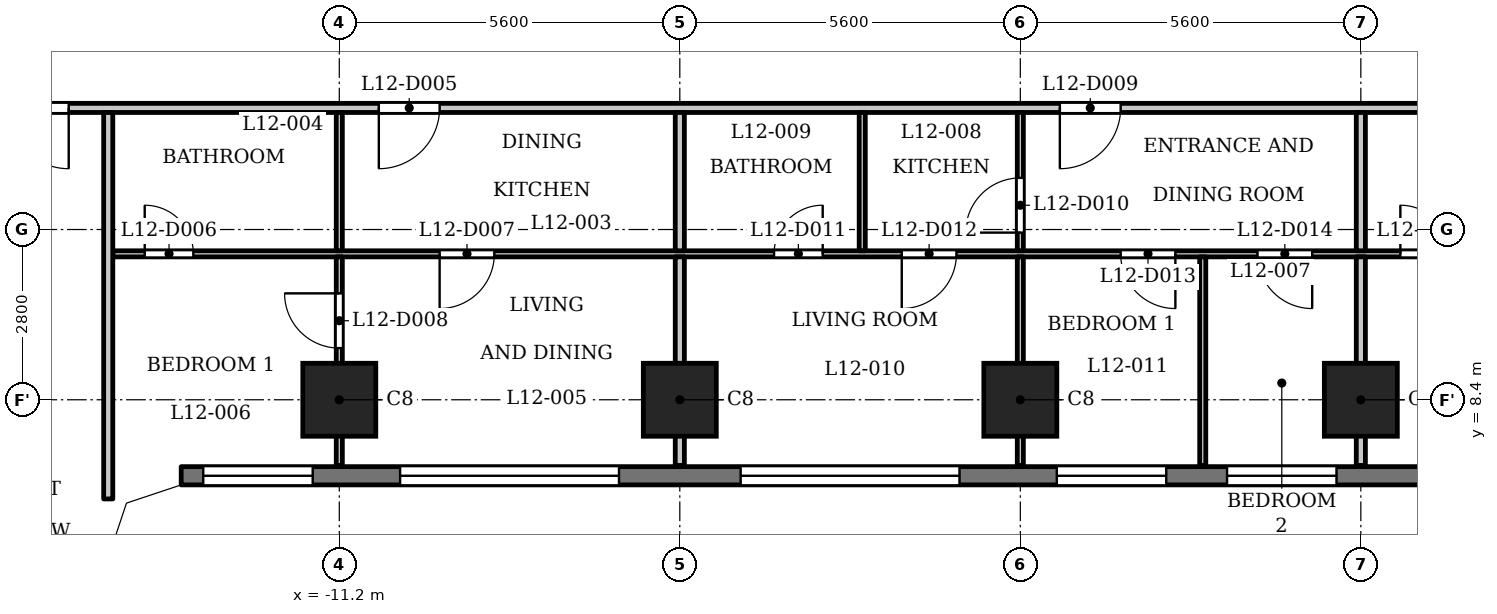
"""IFC4 building model, lengths in metres.
Left out: names, types, materials, properties, quantities, classifications, styles, units other than length and angle.
Written with IfcOpenShell. Run it as: python <this file> out.ifc"""

import sys

from ifc_helpers import new_model, si_unit, direction, frame, frame_2d, origin, origin_2d, place, context, subcontext, project, spatial, polyline, rectangle, outline, extrude, element, fill, save


model = new_model("IFC4")
c1 = context("Model", 3, precision=1e-05, world=origin(), true_north=direction((0.0, 1.0)))
c2 = subcontext(c1, "Body", "Model", "MODEL_VIEW")
j1 = project(units=[si_unit("LENGTHUNIT", "METRE"), si_unit("PLANEANGLEUNIT", "RADIAN")], contexts=[c1])
p1 = place(None, origin())
s1 = spatial("IfcSite", under=j1, at=p1, CompositionType="ELEMENT")
p2 = place(p1, origin())
s2 = spatial("IfcBuilding", under=s1, at=p2, CompositionType="ELEMENT")
p3 = place(p2, frame((0.0, 0.0, 51.5)))
s3 = spatial("IfcBuildingStorey", under=s2, at=p3, CompositionType="ELEMENT", Elevation=51.5)
for number, where, z_axis, x_axis in (
    (1, (-11.2, 8.4, 0.0), (0.0, 0.0, 1.0), (1.0, 0.0, 0.0)),
    (2, (-5.6, 8.4, 0.0), (0.0, 0.0, 1.0), (1.0, 0.0, 0.0)),
    (3, (0.0, 8.4, 0.0), (0.0, 0.0, 1.0), (1.0, 0.0, 0.0)),
    (4, (5.6, 8.4, 0.0), (0.0, 0.0, 1.0), (1.0, 0.0, 0.0)),
):
    element("IfcColumn", number, at=place(p3, frame(where, z_axis=z_axis, x_axis=x_axis)), inside=s3, PredefinedType="COLUMN", context=c2, shape_type="SweptSolid", body=[
        extrude(rectangle(XDim=1.2, YDim=1.2, at=origin_2d()), origin(), (0.0, 0.0, 1.0), 3.5),
    ])
p4 = place(p3, frame((-13.8, 7.15, 0.0), z_axis=(0.0, 0.0, 1.0), x_axis=(1.0, 0.0, 0.0)))
e5 = element("IfcWall", 5, at=p4, inside=s3, PredefinedType="SOLIDWALL", context=c2, shape_type="SweptSolid", body=[
    extrude(rectangle(XDim=27.6, YDim=0.3, at=frame_2d((13.8, 0.0))), origin(), (0.0, 0.0, 1.0), 3.2),
])
p5 = place(p4, frame((0.363, 0.0, 0.9)))
e6 = element("IfcOpeningElement", 6, at=p5, cuts=e5, PredefinedType="OPENING", context=c2, shape_type="SweptSolid", body=[
    extrude(rectangle(XDim=1.8, YDim=1.25, at=frame_2d((0.9, 0.625))), frame((0.0, 0.16, 0.0), z_axis=(0.0, -1.0, 0.0), x_axis=(1.0, 0.0, 0.0)), (0.0, 0.0, 1.0), 0.32),
])
p6 = place(p4, frame((3.6, 0.0, 1.2)))
e7 = element("IfcOpeningElement", 7, at=p6, cuts=e5, PredefinedType="OPENING", context=c2, shape_type="SweptSolid", body=[
    extrude(rectangle(XDim=3.6, YDim=0.95, at=frame_2d((1.8, 0.475))), frame((0.0, 0.16, 0.0), z_axis=(0.0, -1.0, 0.0), x_axis=(1.0, 0.0, 0.0)), (0.0, 0.0, 1.0), 0.32),
])
p7 = place(p4, frame((9.2, 0.0, 1.2)))
e8 = element("IfcOpeningElement", 8, at=p7, cuts=e5, PredefinedType="OPENING", context=c2, shape_type="SweptSolid", body=[
    extrude(rectangle(XDim=3.6, YDim=0.95, at=frame_2d((1.8, 0.475))), frame((0.0, 0.16, 0.0), z_axis=(0.0, -1.0, 0.0), x_axis=(1.0, 0.0, 0.0)), (0.0, 0.0, 1.0), 0.32),
])
p8 = place(p4, frame((14.4, 0.0, 0.9)))
e9 = element("IfcOpeningElement", 9, at=p8, cuts=e5, PredefinedType="OPENING", context=c2, shape_type="SweptSolid", body=[
    extrude(rectangle(XDim=1.8, YDim=1.25, at=frame_2d((0.9, 0.625))), frame((0.0, 0.16, 0.0), z_axis=(0.0, -1.0, 0.0), x_axis=(1.0, 0.0, 0.0)), (0.0, 0.0, 1.0), 0.32),
])
p9 = place(p4, frame((17.2, 0.0, 0.9)))
e10 = element("IfcOpeningElement", 10, at=p9, cuts=e5, PredefinedType="OPENING", context=c2, shape_type="SweptSolid", body=[
    extrude(rectangle(XDim=1.8, YDim=1.25, at=frame_2d((0.9, 0.625))), frame((0.0, 0.16, 0.0), z_axis=(0.0, -1.0, 0.0), x_axis=(1.0, 0.0, 0.0)), (0.0, 0.0, 1.0), 0.32),
])
p10 = place(p4, frame((20.4, 0.0, 1.2)))
e11 = element("IfcOpeningElement", 11, at=p10, cuts=e5, PredefinedType="OPENING", context=c2, shape_type="SweptSolid", body=[
    extrude(rectangle(XDim=3.6, YDim=0.95, at=frame_2d((1.8, 0.475))), frame((0.0, 0.16, 0.0), z_axis=(0.0, -1.0, 0.0), x_axis=(1.0, 0.0, 0.0)), (0.0, 0.0, 1.0), 0.32),
])
p11 = place(p4, frame((25.438, 0.0, 0.9)))
e12 = element("IfcOpeningElement", 12, at=p11, cuts=e5, PredefinedType="OPENING", context=c2, shape_type="SweptSolid", body=[
    extrude(rectangle(XDim=1.8, YDim=1.25, at=frame_2d((0.9, 0.625))), frame((0.0, 0.16, 0.0), z_axis=(0.0, -1.0, 0.0), x_axis=(1.0, 0.0, 0.0)), (0.0, 0.0, 1.0), 0.32),
])
p12 = place(p3, frame((-14.925, 10.8, 0.0), z_axis=(0.0, 0.0, 1.0), x_axis=(1.0, 0.0, 0.0)))
e13 = element("IfcWall", 13, at=p12, inside=s3, PredefinedType="PARTITIONING", context=c2, shape_type="SweptSolid", body=[
    extrude(rectangle(XDim=29.85, YDim=0.1, at=frame_2d((14.925, 0.0))), origin(), (0.0, 0.0, 1.0), 3.2),
])
p13 = place(p12, frame((0.525, 0.0, 0.0)))
e14 = element("IfcOpeningElement", 14, at=p13, cuts=e13, PredefinedType="OPENING", context=c2, shape_type="SweptSolid", body=[
    extrude(rectangle(XDim=0.8, YDim=2.1, at=frame_2d((0.4, 1.05))), frame((0.0, 0.06, 0.0), z_axis=(0.0, -1.0, 0.0), x_axis=(1.0, 0.0, 0.0)), (0.0, 0.0, 1.0), 0.12),
])
p14 = place(p12, frame((5.375, 0.0, 0.0)))
e15 = element("IfcOpeningElement", 15, at=p14, cuts=e13, PredefinedType="OPENING", context=c2, shape_type="SweptSolid", body=[
    extrude(rectangle(XDim=0.9, YDim=2.1, at=frame_2d((0.45, 1.05))), frame((0.0, 0.06, 0.0), z_axis=(0.0, -1.0, 0.0), x_axis=(1.0, 0.0, 0.0)), (0.0, 0.0, 1.0), 0.12),
])
p15 = place(p12, frame((10.875, 0.0, 0.0)))
e16 = element("IfcOpeningElement", 16, at=p15, cuts=e13, PredefinedType="OPENING", context=c2, shape_type="SweptSolid", body=[
    extrude(rectangle(XDim=0.8, YDim=2.1, at=frame_2d((0.4, 1.05))), frame((0.0, 0.06, 0.0), z_axis=(0.0, -1.0, 0.0), x_axis=(1.0, 0.0, 0.0)), (0.0, 0.0, 1.0), 0.12),
])
p16 = place(p12, frame((12.975, 0.0, 0.0)))
e17 = element("IfcOpeningElement", 17, at=p16, cuts=e13, PredefinedType="OPENING", context=c2, shape_type="SweptSolid", body=[
    extrude(rectangle(XDim=0.9, YDim=2.1, at=frame_2d((0.45, 1.05))), frame((0.0, 0.06, 0.0), z_axis=(0.0, -1.0, 0.0), x_axis=(1.0, 0.0, 0.0)), (0.0, 0.0, 1.0), 0.12),
])
p17 = place(p12, frame((16.575, 0.0, 0.0)))
e18 = element("IfcOpeningElement", 18, at=p17, cuts=e13, PredefinedType="OPENING", context=c2, shape_type="SweptSolid", body=[
    extrude(rectangle(XDim=0.9, YDim=2.1, at=frame_2d((0.45, 1.05))), frame((0.0, 0.06, 0.0), z_axis=(0.0, -1.0, 0.0), x_axis=(1.0, 0.0, 0.0)), (0.0, 0.0, 1.0), 0.12),
])
p18 = place(p12, frame((18.825, 0.0, 0.0)))
e19 = element("IfcOpeningElement", 19, at=p18, cuts=e13, PredefinedType="OPENING", context=c2, shape_type="SweptSolid", body=[
    extrude(rectangle(XDim=0.9, YDim=2.1, at=frame_2d((0.45, 1.05))), frame((0.0, 0.06, 0.0), z_axis=(0.0, -1.0, 0.0), x_axis=(1.0, 0.0, 0.0)), (0.0, 0.0, 1.0), 0.12),
])
p19 = place(p12, frame((21.175, 0.0, 0.0)))
e20 = element("IfcOpeningElement", 20, at=p19, cuts=e13, PredefinedType="OPENING", context=c2, shape_type="SweptSolid", body=[
    extrude(rectangle(XDim=0.8, YDim=2.1, at=frame_2d((0.4, 1.05))), frame((0.0, 0.06, 0.0), z_axis=(0.0, -1.0, 0.0), x_axis=(1.0, 0.0, 0.0)), (0.0, 0.0, 1.0), 0.12),
])
p20 = place(p12, frame((27.775, 0.0, 0.0)))
e21 = element("IfcOpeningElement", 21, at=p20, cuts=e13, PredefinedType="OPENING", context=c2, shape_type="SweptSolid", body=[
    extrude(rectangle(XDim=0.9, YDim=2.1, at=frame_2d((0.45, 1.05))), frame((0.0, 0.06, 0.0), z_axis=(0.0, -1.0, 0.0), x_axis=(1.0, 0.0, 0.0)), (0.0, 0.0, 1.0), 0.12),
])
p21 = place(p3, frame((-17.4, 13.2, 0.0), z_axis=(0.0, 0.0, 1.0), x_axis=(1.0, 0.0, 0.0)))
e22 = element("IfcWall", 22, at=p21, inside=s3, PredefinedType="PARTITIONING", context=c2, shape_type="SweptSolid", body=[
    extrude(rectangle(XDim=34.8, YDim=0.15, at=frame_2d((17.4, 0.0))), origin(), (0.0, 0.0, 1.0), 3.2),
])
p22 = place(p21, frame((0.75, 0.0, 0.0)))
e23 = element("IfcOpeningElement", 23, at=p22, cuts=e22, PredefinedType="OPENING", context=c2, shape_type="SweptSolid", body=[
    extrude(rectangle(XDim=1.0, YDim=2.1, at=frame_2d((0.5, 1.05))), frame((0.0, 0.085, 0.0), z_axis=(0.0, -1.0, 0.0), x_axis=(1.0, 0.0, 0.0)), (0.0, 0.0, 1.0), 0.17),
])
p23 = place(p21, frame((33.15, 0.0, 0.0)))
e24 = element("IfcOpeningElement", 24, at=p23, cuts=e22, PredefinedType="OPENING", context=c2, shape_type="SweptSolid", body=[
    extrude(rectangle(XDim=1.0, YDim=2.1, at=frame_2d((0.5, 1.05))), frame((0.0, 0.085, 0.0), z_axis=(0.0, -1.0, 0.0), x_axis=(1.0, 0.0, 0.0)), (0.0, 0.0, 1.0), 0.17),
])
p24 = place(p21, frame((6.85, 0.0, 0.0)))
e25 = element("IfcOpeningElement", 25, at=p24, cuts=e22, PredefinedType="OPENING", context=c2, shape_type="SweptSolid", body=[
    extrude(rectangle(XDim=1.0, YDim=2.1, at=frame_2d((0.5, 1.05))), frame((0.0, 0.085, 0.0), z_axis=(0.0, -1.0, 0.0), x_axis=(1.0, 0.0, 0.0)), (0.0, 0.0, 1.0), 0.17),
])
p25 = place(p21, frame((18.05, 0.0, 0.0)))
e26 = element("IfcOpeningElement", 26, at=p25, cuts=e22, PredefinedType="OPENING", context=c2, shape_type="SweptSolid", body=[
    extrude(rectangle(XDim=1.0, YDim=2.1, at=frame_2d((0.5, 1.05))), frame((0.0, 0.085, 0.0), z_axis=(0.0, -1.0, 0.0), x_axis=(1.0, 0.0, 0.0)), (0.0, 0.0, 1.0), 0.17),
])
p26 = place(p21, frame((29.25, 0.0, 0.0)))
e27 = element("IfcOpeningElement", 27, at=p26, cuts=e22, PredefinedType="OPENING", context=c2, shape_type="SweptSolid", body=[
    extrude(rectangle(XDim=1.0, YDim=2.1, at=frame_2d((0.5, 1.05))), frame((0.0, 0.085, 0.0), z_axis=(0.0, -1.0, 0.0), x_axis=(1.0, 0.0, 0.0)), (0.0, 0.0, 1.0), 0.17),
])
p27 = place(p3, frame((-15.0, 6.769, 0.0), z_axis=(0.0, 0.0, 1.0), x_axis=(0.0, 1.0, 0.0)))
e28 = element("IfcWall", 28, at=p27, inside=s3, PredefinedType="PARTITIONING", context=c2, shape_type="SweptSolid", body=[
    extrude(rectangle(XDim=6.356, YDim=0.15, at=frame_2d((3.178, 0.0))), origin(), (0.0, 0.0, 1.0), 3.2),
])
p28 = place(p3, frame((-11.2, 7.32, 0.0), z_axis=(0.0, 0.0, 1.0), x_axis=(0.0, 1.0, 0.0)))
e29 = element("IfcWall", 29, at=p28, inside=s3, PredefinedType="PARTITIONING", context=c2, shape_type="SweptSolid", body=[
    extrude(rectangle(XDim=3.43, YDim=0.1, at=frame_2d((1.715, 0.0))), origin(), (0.0, 0.0, 1.0), 3.2),
])
p29 = place(p28, frame((1.93, 0.0, 0.0)))
e30 = element("IfcOpeningElement", 30, at=p29, cuts=e29, PredefinedType="OPENING", context=c2, shape_type="SweptSolid", body=[
    extrude(rectangle(XDim=0.9, YDim=2.1, at=frame_2d((0.45, 1.05))), frame((0.0, 0.06, 0.0), z_axis=(0.0, -1.0, 0.0), x_axis=(1.0, 0.0, 0.0)), (0.0, 0.0, 1.0), 0.12),
])
p30 = place(p3, frame((-11.2, 10.85, 0.0), z_axis=(0.0, 0.0, 1.0), x_axis=(0.0, 1.0, 0.0)))
e31 = element("IfcWall", 31, at=p30, inside=s3, PredefinedType="PARTITIONING", context=c2, shape_type="SweptSolid", body=[
    extrude(rectangle(XDim=2.275, YDim=0.1, at=frame_2d((1.137, 0.0))), origin(), (0.0, 0.0, 1.0), 3.2),
])
p31 = place(p3, frame((-5.6, 7.32, 0.0), z_axis=(0.0, 0.0, 1.0), x_axis=(0.0, 1.0, 0.0)))
e32 = element("IfcWall", 32, at=p31, inside=s3, PredefinedType="PARTITIONING", context=c2, shape_type="SweptSolid", body=[
    extrude(rectangle(XDim=3.43, YDim=0.15, at=frame_2d((1.715, 0.0))), origin(), (0.0, 0.0, 1.0), 3.2),
])
p32 = place(p3, frame((-5.6, 10.85, 0.0), z_axis=(0.0, 0.0, 1.0), x_axis=(0.0, 1.0, 0.0)))
e33 = element("IfcWall", 33, at=p32, inside=s3, PredefinedType="PARTITIONING", context=c2, shape_type="SweptSolid", body=[
    extrude(rectangle(XDim=2.275, YDim=0.15, at=frame_2d((1.137, 0.0))), origin(), (0.0, 0.0, 1.0), 3.2),
])
p33 = place(p3, frame((-2.6, 10.85, 0.0), z_axis=(0.0, 0.0, 1.0), x_axis=(0.0, 1.0, 0.0)))
e34 = element("IfcWall", 34, at=p33, inside=s3, PredefinedType="PARTITIONING", context=c2, shape_type="SweptSolid", body=[
    extrude(rectangle(XDim=2.275, YDim=0.1, at=frame_2d((1.137, 0.0))), origin(), (0.0, 0.0, 1.0), 3.2),
])
p34 = place(p3, frame((0.0, 7.32, 0.0), z_axis=(0.0, 0.0, 1.0), x_axis=(0.0, 1.0, 0.0)))
e35 = element("IfcWall", 35, at=p34, inside=s3, PredefinedType="PARTITIONING", context=c2, shape_type="SweptSolid", body=[
    extrude(rectangle(XDim=3.43, YDim=0.1, at=frame_2d((1.715, 0.0))), origin(), (0.0, 0.0, 1.0), 3.2),
])
p35 = place(p3, frame((0.0, 10.85, 0.0), z_axis=(0.0, 0.0, 1.0), x_axis=(0.0, 1.0, 0.0)))
e36 = element("IfcWall", 36, at=p35, inside=s3, PredefinedType="PARTITIONING", context=c2, shape_type="SweptSolid", body=[
    extrude(rectangle(XDim=2.275, YDim=0.1, at=frame_2d((1.137, 0.0))), origin(), (0.0, 0.0, 1.0), 3.2),
])
p36 = place(p35, frame((0.299, 0.0, 0.0)))
e37 = element("IfcOpeningElement", 37, at=p36, cuts=e36, PredefinedType="OPENING", context=c2, shape_type="SweptSolid", body=[
    extrude(rectangle(XDim=0.9, YDim=2.1, at=frame_2d((0.45, 1.05))), frame((0.0, 0.06, 0.0), z_axis=(0.0, -1.0, 0.0), x_axis=(1.0, 0.0, 0.0)), (0.0, 0.0, 1.0), 0.12),
])
p37 = place(p3, frame((3.0, 7.32, 0.0), z_axis=(0.0, 0.0, 1.0), x_axis=(0.0, 1.0, 0.0)))
e38 = element("IfcWall", 38, at=p37, inside=s3, PredefinedType="PARTITIONING", context=c2, shape_type="SweptSolid", body=[
    extrude(rectangle(XDim=3.43, YDim=0.1, at=frame_2d((1.715, 0.0))), origin(), (0.0, 0.0, 1.0), 3.2),
])
p38 = place(p3, frame((5.6, 7.32, 0.0), z_axis=(0.0, 0.0, 1.0), x_axis=(0.0, 1.0, 0.0)))
e39 = element("IfcWall", 39, at=p38, inside=s3, PredefinedType="PARTITIONING", context=c2, shape_type="SweptSolid", body=[
    extrude(rectangle(XDim=3.43, YDim=0.15, at=frame_2d((1.715, 0.0))), origin(), (0.0, 0.0, 1.0), 3.2),
])
p39 = place(p3, frame((5.6, 10.85, 0.0), z_axis=(0.0, 0.0, 1.0), x_axis=(0.0, 1.0, 0.0)))
e40 = element("IfcWall", 40, at=p39, inside=s3, PredefinedType="PARTITIONING", context=c2, shape_type="SweptSolid", body=[
    extrude(rectangle(XDim=2.275, YDim=0.15, at=frame_2d((1.137, 0.0))), origin(), (0.0, 0.0, 1.0), 3.2),
])
p40 = place(p3, origin())
e41 = element("IfcWall", 41, at=p40, inside=s3, PredefinedType="SOLIDWALL", context=c2, shape_type="SweptSolid", body=[
    extrude(outline(polyline([(-13.849, 7.3), (-14.937, 6.937), (-15.3, 5.849), (-15.3, 5.8), (-15.0, 5.8), (-14.7, 6.7), (-13.8, 7.0), (-13.8, 7.3), (-13.849, 7.3)])), origin(), (0.0, 0.0, 1.0), 3.2),
])
p41 = place(p22, origin())
e42 = element("IfcDoor", 42, at=p41, inside=s3, OperationType="SINGLE_SWING_RIGHT", PredefinedType="DOOR", context=c2, shape_type="SweptSolid", body=[
    extrude(rectangle(XDim=1.0, YDim=2.1, at=frame_2d((0.5, 1.05))), frame((0.0, 0.025, 0.0), z_axis=(0.0, -1.0, 0.0), x_axis=(1.0, 0.0, 0.0)), (0.0, 0.0, 1.0), 0.05),
])
fill(e23, e42)
p42 = place(p24, origin())
e43 = element("IfcDoor", 43, at=p42, inside=s3, OperationType="SINGLE_SWING_LEFT", PredefinedType="DOOR", context=c2, shape_type="SweptSolid", body=[
    extrude(rectangle(XDim=1.0, YDim=2.1, at=frame_2d((0.5, 1.05))), frame((0.0, 0.025, 0.0), z_axis=(0.0, -1.0, 0.0), x_axis=(1.0, 0.0, 0.0)), (0.0, 0.0, 1.0), 0.05),
])
fill(e25, e43)
p43 = place(p13, origin())
e44 = element("IfcDoor", 44, at=p43, inside=s3, OperationType="SINGLE_SWING_RIGHT", PredefinedType="DOOR", context=c2, shape_type="SweptSolid", body=[
    extrude(rectangle(XDim=0.8, YDim=2.1, at=frame_2d((0.4, 1.05))), frame((0.0, 0.025, 0.0), z_axis=(0.0, -1.0, 0.0), x_axis=(1.0, 0.0, 0.0)), (0.0, 0.0, 1.0), 0.05),
])
fill(e14, e44)
p44 = place(p14, origin())
e45 = element("IfcDoor", 45, at=p44, inside=s3, OperationType="SINGLE_SWING_LEFT", PredefinedType="DOOR", context=c2, shape_type="SweptSolid", body=[
    extrude(rectangle(XDim=0.9, YDim=2.1, at=frame_2d((0.45, 1.05))), frame((0.0, 0.025, 0.0), z_axis=(0.0, -1.0, 0.0), x_axis=(1.0, 0.0, 0.0)), (0.0, 0.0, 1.0), 0.05),
])
fill(e15, e45)
p45 = place(p29, origin())
e46 = element("IfcDoor", 46, at=p45, inside=s3, OperationType="SINGLE_SWING_LEFT", PredefinedType="DOOR", context=c2, shape_type="SweptSolid", body=[
    extrude(rectangle(XDim=0.9, YDim=2.1, at=frame_2d((0.45, 1.05))), frame((0.0, 0.025, 0.0), z_axis=(0.0, -1.0, 0.0), x_axis=(1.0, 0.0, 0.0)), (0.0, 0.0, 1.0), 0.05),
])
fill(e30, e46)
p46 = place(p25, origin())
e47 = element("IfcDoor", 47, at=p46, inside=s3, OperationType="SINGLE_SWING_LEFT", PredefinedType="DOOR", context=c2, shape_type="SweptSolid", body=[
    extrude(rectangle(XDim=1.0, YDim=2.1, at=frame_2d((0.5, 1.05))), frame((0.0, 0.025, 0.0), z_axis=(0.0, -1.0, 0.0), x_axis=(1.0, 0.0, 0.0)), (0.0, 0.0, 1.0), 0.05),
])
fill(e26, e47)
p47 = place(p36, origin())
e48 = element("IfcDoor", 48, at=p47, inside=s3, OperationType="SINGLE_SWING_RIGHT", PredefinedType="DOOR", context=c2, shape_type="SweptSolid", body=[
    extrude(rectangle(XDim=0.9, YDim=2.1, at=frame_2d((0.45, 1.05))), frame((0.0, 0.025, 0.0), z_axis=(0.0, -1.0, 0.0), x_axis=(1.0, 0.0, 0.0)), (0.0, 0.0, 1.0), 0.05),
])
fill(e37, e48)
p48 = place(p15, origin())
e49 = element("IfcDoor", 49, at=p48, inside=s3, OperationType="SINGLE_SWING_LEFT", PredefinedType="DOOR", context=c2, shape_type="SweptSolid", body=[
    extrude(rectangle(XDim=0.8, YDim=2.1, at=frame_2d((0.4, 1.05))), frame((0.0, 0.025, 0.0), z_axis=(0.0, -1.0, 0.0), x_axis=(1.0, 0.0, 0.0)), (0.0, 0.0, 1.0), 0.05),
])
fill(e16, e49)
p49 = place(p16, origin())
e50 = element("IfcDoor", 50, at=p49, inside=s3, OperationType="SINGLE_SWING_LEFT", PredefinedType="DOOR", context=c2, shape_type="SweptSolid", body=[
    extrude(rectangle(XDim=0.9, YDim=2.1, at=frame_2d((0.45, 1.05))), frame((0.0, 0.025, 0.0), z_axis=(0.0, -1.0, 0.0), x_axis=(1.0, 0.0, 0.0)), (0.0, 0.0, 1.0), 0.05),
])
fill(e17, e50)
p50 = place(p17, origin())
e51 = element("IfcDoor", 51, at=p50, inside=s3, OperationType="SINGLE_SWING_RIGHT", PredefinedType="DOOR", context=c2, shape_type="SweptSolid", body=[
    extrude(rectangle(XDim=0.9, YDim=2.1, at=frame_2d((0.45, 1.05))), frame((0.0, 0.025, 0.0), z_axis=(0.0, -1.0, 0.0), x_axis=(1.0, 0.0, 0.0)), (0.0, 0.0, 1.0), 0.05),
])
fill(e18, e51)
p51 = place(p18, origin())
e52 = element("IfcDoor", 52, at=p51, inside=s3, OperationType="SINGLE_SWING_RIGHT", PredefinedType="DOOR", context=c2, shape_type="SweptSolid", body=[
    extrude(rectangle(XDim=0.9, YDim=2.1, at=frame_2d((0.45, 1.05))), frame((0.0, 0.025, 0.0), z_axis=(0.0, -1.0, 0.0), x_axis=(1.0, 0.0, 0.0)), (0.0, 0.0, 1.0), 0.05),
])
fill(e19, e52)
p52 = place(p19, origin())
e53 = element("IfcDoor", 53, at=p52, inside=s3, OperationType="SINGLE_SWING_RIGHT", PredefinedType="DOOR", context=c2, shape_type="SweptSolid", body=[
    extrude(rectangle(XDim=0.8, YDim=2.1, at=frame_2d((0.4, 1.05))), frame((0.0, 0.025, 0.0), z_axis=(0.0, -1.0, 0.0), x_axis=(1.0, 0.0, 0.0)), (0.0, 0.0, 1.0), 0.05),
])
fill(e20, e53)
p53 = place(p5, origin())
e54 = element("IfcWindow", 54, at=p53, inside=s3, PartitioningType="SINGLE_PANEL", PredefinedType="WINDOW", context=c2, shape_type="SweptSolid", body=[
    extrude(rectangle(XDim=1.8, YDim=1.25, at=frame_2d((0.9, 0.625))), frame((0.0, 0.03, 0.0), z_axis=(0.0, -1.0, 0.0), x_axis=(1.0, 0.0, 0.0)), (0.0, 0.0, 1.0), 0.06),
])
fill(e6, e54)
p54 = place(p6, origin())
e55 = element("IfcWindow", 55, at=p54, inside=s3, PartitioningType="SINGLE_PANEL", PredefinedType="WINDOW", context=c2, shape_type="SweptSolid", body=[
    extrude(rectangle(XDim=3.6, YDim=0.95, at=frame_2d((1.8, 0.475))), frame((0.0, 0.03, 0.0), z_axis=(0.0, -1.0, 0.0), x_axis=(1.0, 0.0, 0.0)), (0.0, 0.0, 1.0), 0.06),
])
fill(e7, e55)
p55 = place(p7, origin())
e56 = element("IfcWindow", 56, at=p55, inside=s3, PartitioningType="SINGLE_PANEL", PredefinedType="WINDOW", context=c2, shape_type="SweptSolid", body=[
    extrude(rectangle(XDim=3.6, YDim=0.95, at=frame_2d((1.8, 0.475))), frame((0.0, 0.03, 0.0), z_axis=(0.0, -1.0, 0.0), x_axis=(1.0, 0.0, 0.0)), (0.0, 0.0, 1.0), 0.06),
])
fill(e8, e56)
p56 = place(p8, origin())
e57 = element("IfcWindow", 57, at=p56, inside=s3, PartitioningType="SINGLE_PANEL", PredefinedType="WINDOW", context=c2, shape_type="SweptSolid", body=[
    extrude(rectangle(XDim=1.8, YDim=1.25, at=frame_2d((0.9, 0.625))), frame((0.0, 0.03, 0.0), z_axis=(0.0, -1.0, 0.0), x_axis=(1.0, 0.0, 0.0)), (0.0, 0.0, 1.0), 0.06),
])
fill(e9, e57)
p57 = place(p9, origin())
e58 = element("IfcWindow", 58, at=p57, inside=s3, PartitioningType="SINGLE_PANEL", PredefinedType="WINDOW", context=c2, shape_type="SweptSolid", body=[
    extrude(rectangle(XDim=1.8, YDim=1.25, at=frame_2d((0.9, 0.625))), frame((0.0, 0.03, 0.0), z_axis=(0.0, -1.0, 0.0), x_axis=(1.0, 0.0, 0.0)), (0.0, 0.0, 1.0), 0.06),
])
fill(e10, e58)
save(model, sys.argv[1])
